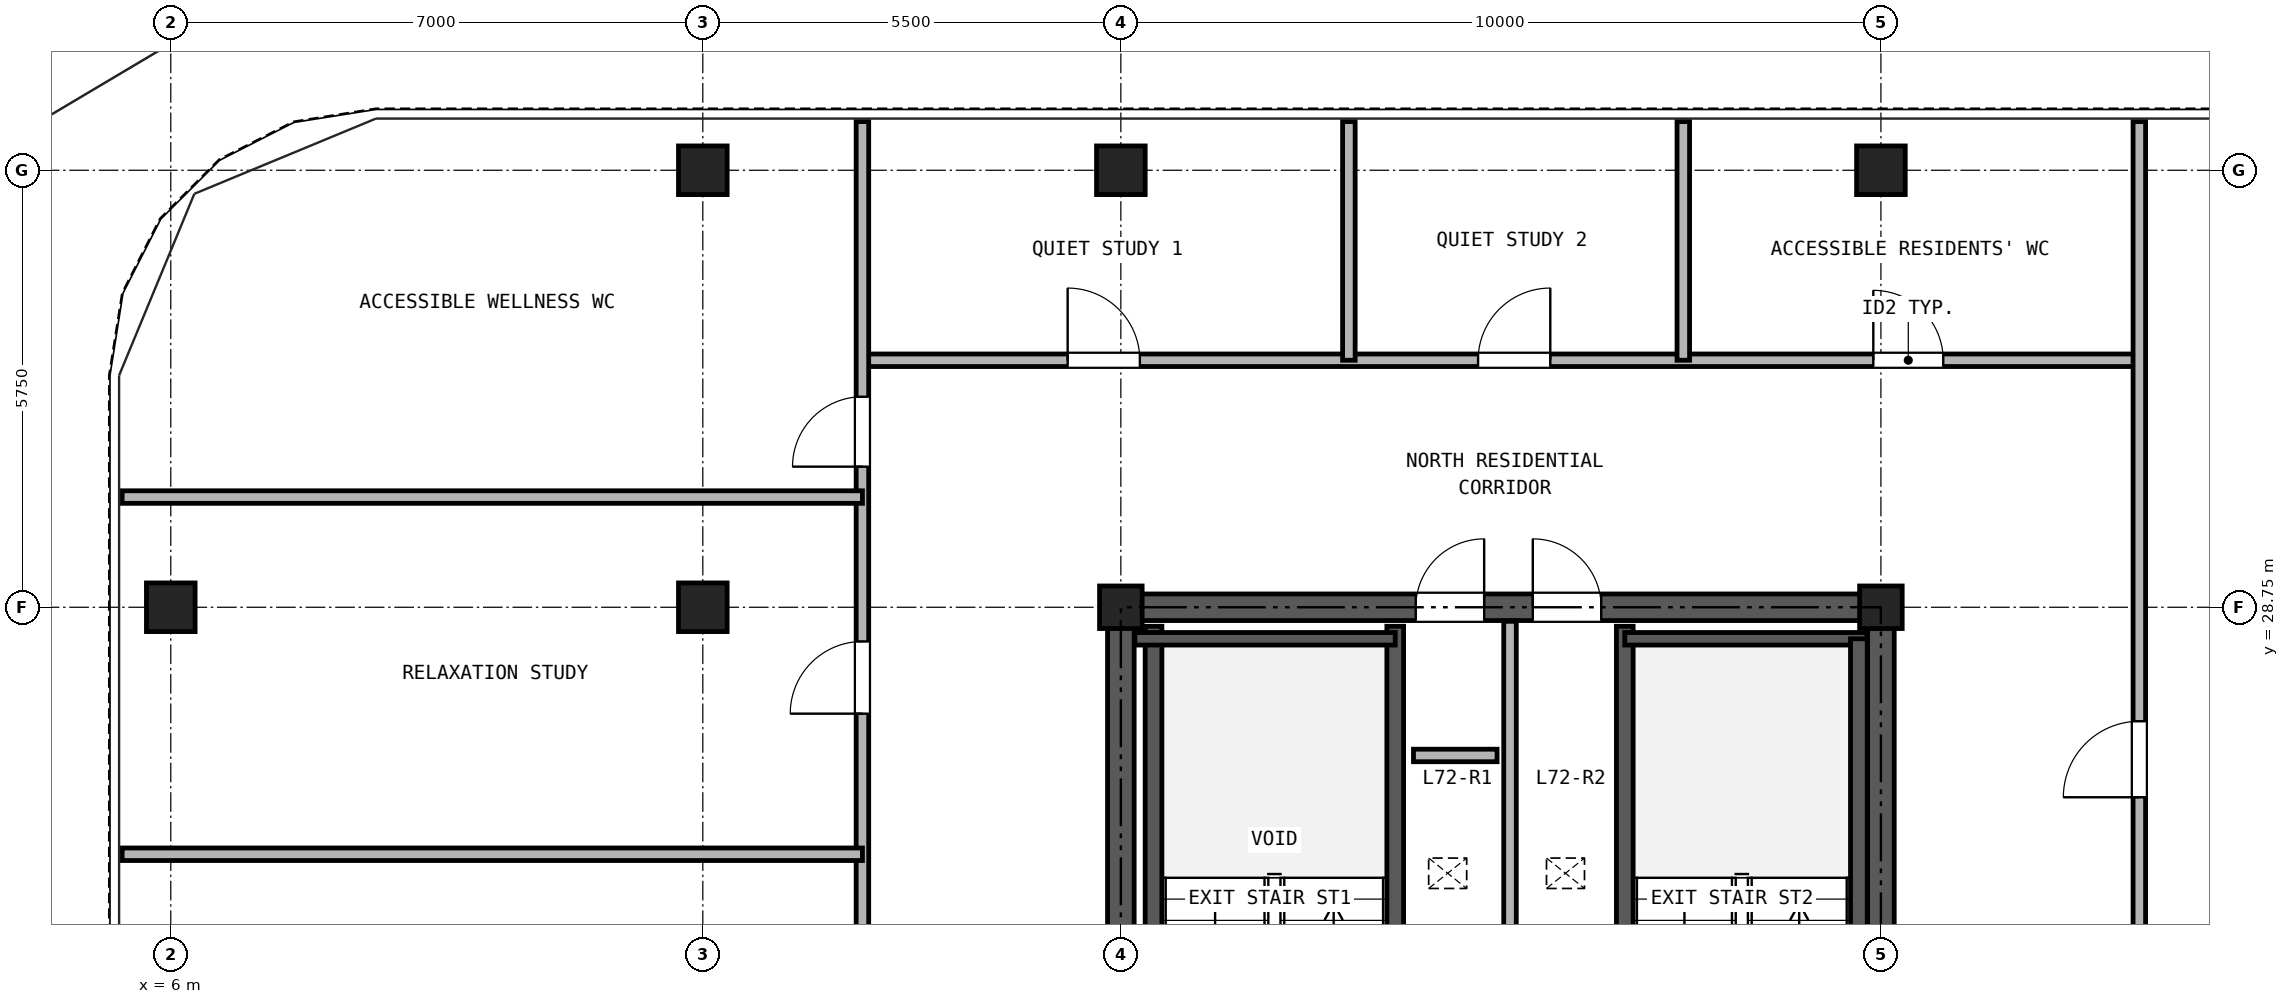
"""IFC4 building model, lengths in metres.
Left out: names, types, materials, properties, quantities, classifications, styles, units other than length and angle.
Written with IfcOpenShell. Run it as: python <this file> out.ifc"""

import sys

from ifc_helpers import new_model, si_unit, direction, frame, frame_2d, origin, origin_2d, place, context, subcontext, project, spatial, rectangle, hollow_rectangle, extrude, source, transform, mapped, element, fill, save


model = new_model("IFC4")
c1 = context("Model", 3, precision=1e-05, world=origin(), true_north=direction((0.0, 1.0)))
c2 = subcontext(c1, "Body", "Model", "MODEL_VIEW")
j1 = project(units=[si_unit("LENGTHUNIT", "METRE"), si_unit("PLANEANGLEUNIT", "RADIAN")], contexts=[c1])
p1 = place(None, origin())
s1 = spatial("IfcSite", under=j1, at=p1, CompositionType="ELEMENT")
p2 = place(p1, origin())
s2 = spatial("IfcBuilding", under=s1, at=p2, CompositionType="ELEMENT")
p3 = place(p2, frame((0.0, 0.0, 252.1)))
s3 = spatial("IfcBuildingStorey", under=s2, at=p3, CompositionType="ELEMENT", Elevation=252.1)
m1 = source(origin(), c2, "Body", "SweptSolid", [
    extrude(hollow_rectangle(XDim=0.64, YDim=0.64, WallThickness=0.035, at=origin_2d()), origin(), (0.0, 0.0, 1.0), 2.98),
])
for number, where, z_axis, x_axis in (
    (1, (13.0, 34.5, 0.0), (0.0, 0.0, 1.0), (1.0, 0.0, 0.0)),
    (2, (18.5, 34.5, 0.0), (0.0, 0.0, 1.0), (1.0, 0.0, 0.0)),
    (3, (28.5, 34.5, 0.0), (0.0, 0.0, 1.0), (1.0, 0.0, 0.0)),
    (4, (6.0, 28.75, 0.0), (0.0, 0.0, 1.0), (1.0, 0.0, 0.0)),
    (5, (13.0, 28.75, 0.0), (0.0, 0.0, 1.0), (1.0, 0.0, 0.0)),
):
    element("IfcColumn", number, at=place(p3, frame(where, z_axis=z_axis, x_axis=x_axis)), inside=s3, PredefinedType="COLUMN", context=c2, shape_type="MappedRepresentation", body=[
        mapped(m1, transform((0.0, 0.0, 0.0), x_axis=(1.0, 0.0, 0.0), y_axis=(0.0, 1.0, 0.0), z_axis=(0.0, 0.0, 1.0), scale=1.0)),
    ])
m2 = source(origin(), c2, "Body", "SweptSolid", [
    extrude(hollow_rectangle(XDim=0.56, YDim=0.56, WallThickness=0.03, at=origin_2d()), origin(), (0.0, 0.0, 1.0), 2.98),
])
for number, where, z_axis, x_axis in (
    (6, (18.5, 28.75, 0.0), (0.0, 0.0, 1.0), (1.0, 0.0, 0.0)),
    (7, (28.5, 28.75, 0.0), (0.0, 0.0, 1.0), (1.0, 0.0, 0.0)),
):
    element("IfcColumn", number, at=place(p3, frame(where, z_axis=z_axis, x_axis=x_axis)), inside=s3, PredefinedType="COLUMN", context=c2, shape_type="MappedRepresentation", body=[
        mapped(m2, transform((0.0, 0.0, 0.0), x_axis=(1.0, 0.0, 0.0), y_axis=(0.0, 1.0, 0.0), z_axis=(0.0, 0.0, 1.0), scale=1.0)),
    ])
p4 = place(p3, frame((18.325, 28.75, 0.0), z_axis=(0.0, 0.0, 1.0), x_axis=(1.0, 0.0, 0.0)))
e8 = element("IfcWall", 8, at=p4, inside=s3, PredefinedType="SHEAR", context=c2, shape_type="SweptSolid", body=[
    extrude(rectangle(XDim=10.35, YDim=0.35, at=frame_2d((5.175, 0.0))), origin(), (0.0, 0.0, 1.0), 2.98),
])
p5 = place(p4, frame((4.055, 0.0, 0.0)))
e9 = element("IfcOpeningElement", 9, at=p5, cuts=e8, PredefinedType="OPENING", context=c2, shape_type="SweptSolid", body=[
    extrude(rectangle(XDim=0.9, YDim=2.05, at=frame_2d((0.45, 1.025))), frame((0.0, 0.185, 0.0), z_axis=(0.0, -1.0, 0.0), x_axis=(1.0, 0.0, 0.0)), (0.0, 0.0, 1.0), 0.37),
])
p6 = place(p4, frame((5.595, 0.0, 0.0)))
e10 = element("IfcOpeningElement", 10, at=p6, cuts=e8, PredefinedType="OPENING", context=c2, shape_type="SweptSolid", body=[
    extrude(rectangle(XDim=0.9, YDim=2.05, at=frame_2d((0.45, 1.025))), frame((0.0, 0.185, 0.0), z_axis=(0.0, -1.0, 0.0), x_axis=(1.0, 0.0, 0.0)), (0.0, 0.0, 1.0), 0.37),
])
p7 = place(p3, frame((18.5, 11.675, 0.0), z_axis=(0.0, 0.0, 1.0), x_axis=(0.0, 1.0, 0.0)))
e11 = element("IfcWall", 11, at=p7, inside=s3, PredefinedType="SHEAR", context=c2, shape_type="SweptSolid", body=[
    extrude(rectangle(XDim=16.9, YDim=0.35, at=frame_2d((8.45, 0.0))), origin(), (0.0, 0.0, 1.0), 2.98),
])
p8 = place(p7, frame((7.475, 0.0, 0.0)))
e12 = element("IfcOpeningElement", 12, at=p8, cuts=e11, PredefinedType="OPENING", context=c2, shape_type="SweptSolid", body=[
    extrude(rectangle(XDim=1.15, YDim=2.2, at=frame_2d((0.575, 1.1))), frame((0.0, 0.185, 0.0), z_axis=(0.0, -1.0, 0.0), x_axis=(1.0, 0.0, 0.0)), (0.0, 0.0, 1.0), 0.37),
])
p9 = place(p3, frame((28.5, 11.675, 0.0), z_axis=(0.0, 0.0, 1.0), x_axis=(0.0, 1.0, 0.0)))
e13 = element("IfcWall", 13, at=p9, inside=s3, PredefinedType="SHEAR", context=c2, shape_type="SweptSolid", body=[
    extrude(rectangle(XDim=16.9, YDim=0.35, at=frame_2d((8.45, 0.0))), origin(), (0.0, 0.0, 1.0), 2.98),
])
p10 = place(p9, frame((7.475, 0.0, 0.0)))
e14 = element("IfcOpeningElement", 14, at=p10, cuts=e13, PredefinedType="OPENING", context=c2, shape_type="SweptSolid", body=[
    extrude(rectangle(XDim=1.15, YDim=2.2, at=frame_2d((0.575, 1.1))), frame((0.0, 0.185, 0.0), z_axis=(0.0, -1.0, 0.0), x_axis=(1.0, 0.0, 0.0)), (0.0, 0.0, 1.0), 0.37),
])
for number, where, z_axis, x_axis in (
    (15, (18.93, 21.39, 0.0), (0.0, 0.0, 1.0), (0.0, 1.0, 0.0)),
    (16, (22.11, 21.39, 0.0), (0.0, 0.0, 1.0), (0.0, 1.0, 0.0)),
    (17, (25.13, 21.39, 0.0), (0.0, 0.0, 1.0), (0.0, 1.0, 0.0)),
):
    element("IfcWall", number, at=place(p3, frame(where, z_axis=z_axis, x_axis=x_axis)), inside=s3, PredefinedType="SOLIDWALL", context=c2, shape_type="SweptSolid", body=[
        extrude(rectangle(XDim=7.11, YDim=0.22, at=frame_2d((3.555, 0.0))), origin(), (0.0, 0.0, 1.0), 2.98),
    ])
p11 = place(p3, frame((18.685, 28.335, 0.0), z_axis=(0.0, 0.0, 1.0), x_axis=(1.0, 0.0, 0.0)))
e18 = element("IfcWall", 18, at=p11, inside=s3, PredefinedType="PARTITIONING", context=c2, shape_type="SweptSolid", body=[
    extrude(rectangle(XDim=3.425, YDim=0.165, at=frame_2d((1.712, 0.0))), origin(), (0.0, 0.0, 1.0), 2.98),
])
p12 = place(p3, frame((25.13, 28.335, 0.0), z_axis=(0.0, 0.0, 1.0), x_axis=(1.0, 0.0, 0.0)))
e19 = element("IfcWall", 19, at=p12, inside=s3, PredefinedType="PARTITIONING", context=c2, shape_type="SweptSolid", body=[
    extrude(rectangle(XDim=3.185, YDim=0.165, at=frame_2d((1.593, 0.0))), origin(), (0.0, 0.0, 1.0), 2.98),
])
p13 = place(p3, frame((28.21, 21.39, 0.0), z_axis=(0.0, 0.0, 1.0), x_axis=(0.0, 1.0, 0.0)))
e20 = element("IfcWall", 20, at=p13, inside=s3, PredefinedType="SOLIDWALL", context=c2, shape_type="SweptSolid", body=[
    extrude(rectangle(XDim=6.945, YDim=0.22, at=frame_2d((3.473, 0.0))), origin(), (0.0, 0.0, 1.0), 2.98),
])
p14 = place(p3, frame((23.62, 24.4, 0.0), z_axis=(0.0, 0.0, 1.0), x_axis=(0.0, 1.0, 0.0)))
e21 = element("IfcWall", 21, at=p14, inside=s3, PredefinedType="PARTITIONING", context=c2, shape_type="SweptSolid", body=[
    extrude(rectangle(XDim=4.165, YDim=0.165, at=frame_2d((2.083, 0.0))), origin(), (0.0, 0.0, 1.0), 2.98),
])
p15 = place(p3, frame((15.1, 32.0, 0.0), z_axis=(0.0, 0.0, 1.0), x_axis=(1.0, 0.0, 0.0)))
e22 = element("IfcWall", 22, at=p15, inside=s3, PredefinedType="PARTITIONING", context=c2, shape_type="SweptSolid", body=[
    extrude(rectangle(XDim=16.8, YDim=0.165, at=frame_2d((8.4, 0.0))), origin(), (0.0, 0.0, 1.0), 2.98),
])
p16 = place(p15, frame((2.7, 0.0, 0.0)))
e23 = element("IfcOpeningElement", 23, at=p16, cuts=e22, PredefinedType="OPENING", context=c2, shape_type="SweptSolid", body=[
    extrude(rectangle(XDim=0.95, YDim=2.15, at=frame_2d((0.475, 1.075))), frame((0.0, 0.093, 0.0), z_axis=(0.0, -1.0, 0.0), x_axis=(1.0, 0.0, 0.0)), (0.0, 0.0, 1.0), 0.185),
])
p17 = place(p15, frame((8.1, 0.0, 0.0)))
e24 = element("IfcOpeningElement", 24, at=p17, cuts=e22, PredefinedType="OPENING", context=c2, shape_type="SweptSolid", body=[
    extrude(rectangle(XDim=0.95, YDim=2.15, at=frame_2d((0.475, 1.075))), frame((0.0, 0.093, 0.0), z_axis=(0.0, -1.0, 0.0), x_axis=(1.0, 0.0, 0.0)), (0.0, 0.0, 1.0), 0.185),
])
p18 = place(p15, frame((13.3, 0.0, 0.0)))
e25 = element("IfcOpeningElement", 25, at=p18, cuts=e22, PredefinedType="OPENING", context=c2, shape_type="SweptSolid", body=[
    extrude(rectangle(XDim=0.92, YDim=2.1, at=frame_2d((0.46, 1.05))), frame((0.0, 0.093, 0.0), z_axis=(0.0, -1.0, 0.0), x_axis=(1.0, 0.0, 0.0)), (0.0, 0.0, 1.0), 0.185),
])
p19 = place(p3, frame((15.1, 10.6, 0.0), z_axis=(0.0, 0.0, 1.0), x_axis=(0.0, 1.0, 0.0)))
e26 = element("IfcWall", 26, at=p19, inside=s3, PredefinedType="PARTITIONING", context=c2, shape_type="SweptSolid", body=[
    extrude(rectangle(XDim=24.54, YDim=0.165, at=frame_2d((12.27, 0.0))), origin(), (0.0, 0.0, 1.0), 2.98),
])
p20 = place(p19, frame((3.45, 0.0, 0.0)))
e27 = element("IfcOpeningElement", 27, at=p20, cuts=e26, PredefinedType="OPENING", context=c2, shape_type="SweptSolid", body=[
    extrude(rectangle(XDim=0.95, YDim=2.15, at=frame_2d((0.475, 1.075))), frame((0.0, 0.093, 0.0), z_axis=(0.0, -1.0, 0.0), x_axis=(1.0, 0.0, 0.0)), (0.0, 0.0, 1.0), 0.185),
])
p21 = place(p19, frame((10.9, 0.0, 0.0)))
e28 = element("IfcOpeningElement", 28, at=p21, cuts=e26, PredefinedType="OPENING", context=c2, shape_type="SweptSolid", body=[
    extrude(rectangle(XDim=0.95, YDim=2.15, at=frame_2d((0.475, 1.075))), frame((0.0, 0.093, 0.0), z_axis=(0.0, -1.0, 0.0), x_axis=(1.0, 0.0, 0.0)), (0.0, 0.0, 1.0), 0.185),
])
p22 = place(p19, frame((16.75, 0.0, 0.0)))
e29 = element("IfcOpeningElement", 29, at=p22, cuts=e26, PredefinedType="OPENING", context=c2, shape_type="SweptSolid", body=[
    extrude(rectangle(XDim=0.95, YDim=2.15, at=frame_2d((0.475, 1.075))), frame((0.0, 0.093, 0.0), z_axis=(0.0, -1.0, 0.0), x_axis=(1.0, 0.0, 0.0)), (0.0, 0.0, 1.0), 0.185),
])
p23 = place(p19, frame((20.0, 0.0, 0.0)))
e30 = element("IfcOpeningElement", 30, at=p23, cuts=e26, PredefinedType="OPENING", context=c2, shape_type="SweptSolid", body=[
    extrude(rectangle(XDim=0.92, YDim=2.1, at=frame_2d((0.46, 1.05))), frame((0.0, 0.093, 0.0), z_axis=(0.0, -1.0, 0.0), x_axis=(1.0, 0.0, 0.0)), (0.0, 0.0, 1.0), 0.185),
])
p24 = place(p3, frame((31.9, 10.6, 0.0), z_axis=(0.0, 0.0, 1.0), x_axis=(0.0, 1.0, 0.0)))
e31 = element("IfcWall", 31, at=p24, inside=s3, PredefinedType="PARTITIONING", context=c2, shape_type="SweptSolid", body=[
    extrude(rectangle(XDim=24.54, YDim=0.165, at=frame_2d((12.27, 0.0))), origin(), (0.0, 0.0, 1.0), 2.98),
])
p25 = place(p24, frame((4.95, 0.0, 0.0)))
e32 = element("IfcOpeningElement", 32, at=p25, cuts=e31, PredefinedType="OPENING", context=c2, shape_type="SweptSolid", body=[
    extrude(rectangle(XDim=1.0, YDim=2.15, at=frame_2d((0.5, 1.075))), frame((0.0, 0.093, 0.0), z_axis=(0.0, -1.0, 0.0), x_axis=(1.0, 0.0, 0.0)), (0.0, 0.0, 1.0), 0.185),
])
p26 = place(p24, frame((15.65, 0.0, 0.0)))
e33 = element("IfcOpeningElement", 33, at=p26, cuts=e31, PredefinedType="OPENING", context=c2, shape_type="SweptSolid", body=[
    extrude(rectangle(XDim=1.0, YDim=2.15, at=frame_2d((0.5, 1.075))), frame((0.0, 0.093, 0.0), z_axis=(0.0, -1.0, 0.0), x_axis=(1.0, 0.0, 0.0)), (0.0, 0.0, 1.0), 0.185),
])
for number, where, z_axis, x_axis in (
    (34, (5.36, 25.5, 0.0), (0.0, 0.0, 1.0), (1.0, 0.0, 0.0)),
    (35, (5.36, 30.2, 0.0), (0.0, 0.0, 1.0), (1.0, 0.0, 0.0)),
):
    element("IfcWall", number, at=place(p3, frame(where, z_axis=z_axis, x_axis=x_axis)), inside=s3, PredefinedType="PARTITIONING", context=c2, shape_type="SweptSolid", body=[
        extrude(rectangle(XDim=9.74, YDim=0.165, at=frame_2d((4.87, 0.0))), origin(), (0.0, 0.0, 1.0), 2.98),
    ])
for number, where, z_axis, x_axis in (
    (36, (21.5, 32.0, 0.0), (0.0, 0.0, 1.0), (0.0, 1.0, 0.0)),
    (37, (25.9, 32.0, 0.0), (0.0, 0.0, 1.0), (0.0, 1.0, 0.0)),
):
    element("IfcWall", number, at=place(p3, frame(where, z_axis=z_axis, x_axis=x_axis)), inside=s3, PredefinedType="PARTITIONING", context=c2, shape_type="SweptSolid", body=[
        extrude(rectangle(XDim=3.14, YDim=0.165, at=frame_2d((1.57, 0.0))), origin(), (0.0, 0.0, 1.0), 2.98),
    ])
p27 = place(p3, frame((22.35, 26.8, 0.0), z_axis=(0.0, 0.0, 1.0), x_axis=(1.0, 0.0, 0.0)))
e38 = element("IfcWall", 38, at=p27, inside=s3, PredefinedType="PARTITIONING", context=c2, shape_type="SweptSolid", body=[
    extrude(rectangle(XDim=1.1, YDim=0.165, at=frame_2d((0.55, 0.0))), origin(), (0.0, 0.0, 1.0), 2.98),
])
p28 = place(p5, origin())
e39 = element("IfcDoor", 39, at=p28, inside=s3, OperationType="SINGLE_SWING_RIGHT", PredefinedType="DOOR", context=c2, shape_type="SweptSolid", body=[
    extrude(rectangle(XDim=0.9, YDim=2.05, at=frame_2d((0.45, 1.025))), frame((0.0, 0.025, 0.0), z_axis=(0.0, -1.0, 0.0), x_axis=(1.0, 0.0, 0.0)), (0.0, 0.0, 1.0), 0.05),
])
fill(e9, e39)
p29 = place(p6, origin())
e40 = element("IfcDoor", 40, at=p29, inside=s3, OperationType="SINGLE_SWING_LEFT", PredefinedType="DOOR", context=c2, shape_type="SweptSolid", body=[
    extrude(rectangle(XDim=0.9, YDim=2.05, at=frame_2d((0.45, 1.025))), frame((0.0, 0.025, 0.0), z_axis=(0.0, -1.0, 0.0), x_axis=(1.0, 0.0, 0.0)), (0.0, 0.0, 1.0), 0.05),
])
fill(e10, e40)
p30 = place(p22, frame((0.95, 0.0, 0.0), z_axis=(0.0, 0.0, 1.0), x_axis=(-1.0, 0.0, 0.0)))
e41 = element("IfcDoor", 41, at=p30, inside=s3, OperationType="SINGLE_SWING_LEFT", PredefinedType="DOOR", context=c2, shape_type="SweptSolid", body=[
    extrude(rectangle(XDim=0.95, YDim=2.15, at=frame_2d((0.475, 1.075))), frame((0.0, 0.025, 0.0), z_axis=(0.0, -1.0, 0.0), x_axis=(1.0, 0.0, 0.0)), (0.0, 0.0, 1.0), 0.05),
])
fill(e29, e41)
p31 = place(p23, frame((0.92, 0.0, 0.0), z_axis=(0.0, 0.0, 1.0), x_axis=(-1.0, 0.0, 0.0)))
e42 = element("IfcDoor", 42, at=p31, inside=s3, OperationType="SINGLE_SWING_LEFT", PredefinedType="DOOR", context=c2, shape_type="SweptSolid", body=[
    extrude(rectangle(XDim=0.92, YDim=2.1, at=frame_2d((0.46, 1.05))), frame((0.0, 0.025, 0.0), z_axis=(0.0, -1.0, 0.0), x_axis=(1.0, 0.0, 0.0)), (0.0, 0.0, 1.0), 0.05),
])
fill(e30, e42)
p32 = place(p26, frame((1.0, 0.0, 0.0), z_axis=(0.0, 0.0, 1.0), x_axis=(-1.0, 0.0, 0.0)))
e43 = element("IfcDoor", 43, at=p32, inside=s3, OperationType="SINGLE_SWING_LEFT", PredefinedType="DOOR", context=c2, shape_type="SweptSolid", body=[
    extrude(rectangle(XDim=1.0, YDim=2.15, at=frame_2d((0.5, 1.075))), frame((0.0, 0.025, 0.0), z_axis=(0.0, -1.0, 0.0), x_axis=(1.0, 0.0, 0.0)), (0.0, 0.0, 1.0), 0.05),
])
fill(e33, e43)
p33 = place(p16, origin())
e44 = element("IfcDoor", 44, at=p33, inside=s3, OperationType="SINGLE_SWING_LEFT", PredefinedType="DOOR", context=c2, shape_type="SweptSolid", body=[
    extrude(rectangle(XDim=0.95, YDim=2.15, at=frame_2d((0.475, 1.075))), frame((0.0, 0.025, 0.0), z_axis=(0.0, -1.0, 0.0), x_axis=(1.0, 0.0, 0.0)), (0.0, 0.0, 1.0), 0.05),
])
fill(e23, e44)
p34 = place(p17, origin())
e45 = element("IfcDoor", 45, at=p34, inside=s3, OperationType="SINGLE_SWING_RIGHT", PredefinedType="DOOR", context=c2, shape_type="SweptSolid", body=[
    extrude(rectangle(XDim=0.95, YDim=2.15, at=frame_2d((0.475, 1.075))), frame((0.0, 0.025, 0.0), z_axis=(0.0, -1.0, 0.0), x_axis=(1.0, 0.0, 0.0)), (0.0, 0.0, 1.0), 0.05),
])
fill(e24, e45)
p35 = place(p18, origin())
e46 = element("IfcDoor", 46, at=p35, inside=s3, OperationType="SINGLE_SWING_LEFT", PredefinedType="DOOR", context=c2, shape_type="SweptSolid", body=[
    extrude(rectangle(XDim=0.92, YDim=2.1, at=frame_2d((0.46, 1.05))), frame((0.0, 0.025, 0.0), z_axis=(0.0, -1.0, 0.0), x_axis=(1.0, 0.0, 0.0)), (0.0, 0.0, 1.0), 0.05),
])
fill(e25, e46)
save(model, sys.argv[1])
